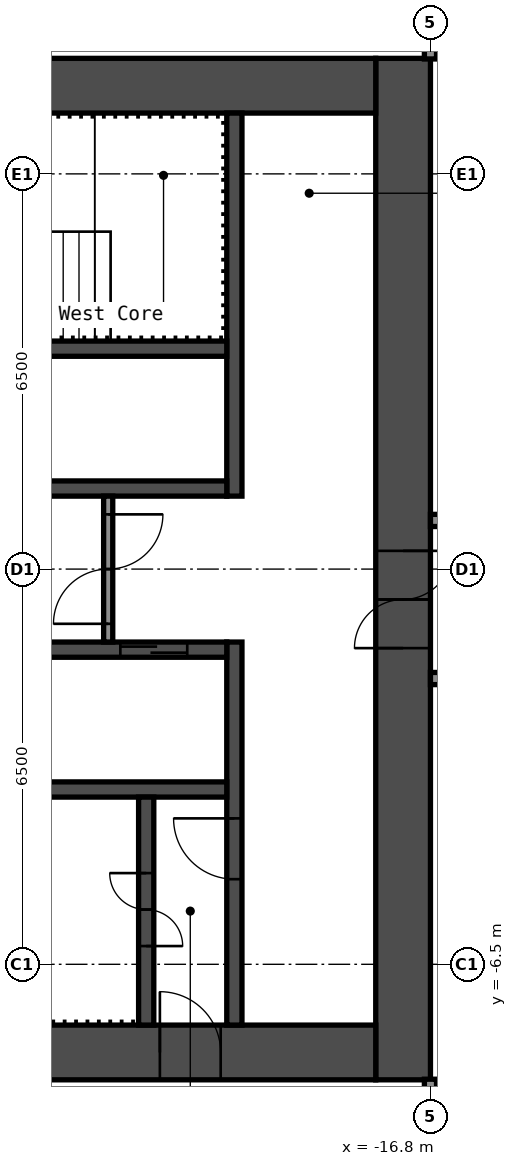
"""IFC4 building model, lengths in metres.
Left out: names, types, materials, properties, quantities, classifications, styles, units other than length and angle.
Written with IfcOpenShell. Run it as: python <this file> out.ifc"""

import sys

from ifc_helpers import new_model, si_unit, direction, frame, frame_2d, origin, place, context, subcontext, project, spatial, rectangle, extrude, element, fill, save


model = new_model("IFC4")
c1 = context("Model", 3, precision=1e-05, world=origin(), true_north=direction((0.0, 1.0)))
c2 = subcontext(c1, "Body", "Model", "MODEL_VIEW")
j1 = project(units=[si_unit("LENGTHUNIT", "METRE"), si_unit("PLANEANGLEUNIT", "RADIAN")], contexts=[c1])
p1 = place(None, origin())
s1 = spatial("IfcSite", under=j1, at=p1, CompositionType="ELEMENT")
p2 = place(p1, origin())
s2 = spatial("IfcBuilding", under=s1, at=p2, CompositionType="ELEMENT")
p3 = place(p2, frame((0.0, 0.0, 137.4)))
s3 = spatial("IfcBuildingStorey", under=s2, at=p3, CompositionType="ELEMENT", Elevation=137.4)
p4 = place(p3, frame((-17.25, -8.4, 0.0), z_axis=(0.0, 0.0, 1.0), x_axis=(0.0, 1.0, 0.0)))
e1 = element("IfcWall", 1, at=p4, inside=s3, PredefinedType="SHEAR", context=c2, shape_type="SweptSolid", body=[
    extrude(rectangle(XDim=16.8, YDim=0.9, at=frame_2d((8.4, 0.0))), origin(), (0.0, 0.0, 1.0), 2.75),
])
p5 = place(p4, frame((7.1, 0.0, 0.0)))
e2 = element("IfcOpeningElement", 2, at=p5, cuts=e1, PredefinedType="OPENING", context=c2, shape_type="SweptSolid", body=[
    extrude(rectangle(XDim=1.6, YDim=2.1, at=frame_2d((0.8, 1.05))), frame((0.0, 0.46, 0.0), z_axis=(0.0, -1.0, 0.0), x_axis=(1.0, 0.0, 0.0)), (0.0, 0.0, 1.0), 0.92),
])
p6 = place(p3, frame((-32.7, 7.95, 0.0), z_axis=(0.0, 0.0, 1.0), x_axis=(1.0, 0.0, 0.0)))
e3 = element("IfcWall", 3, at=p6, inside=s3, PredefinedType="SHEAR", context=c2, shape_type="SweptSolid", body=[
    extrude(rectangle(XDim=15.0, YDim=0.9, at=frame_2d((7.5, 0.0))), origin(), (0.0, 0.0, 1.0), 2.75),
])
p7 = place(p6, frame((3.4, 0.0, 0.0)))
e4 = element("IfcOpeningElement", 4, at=p7, cuts=e3, PredefinedType="OPENING", context=c2, shape_type="SweptSolid", body=[
    extrude(rectangle(XDim=1.2, YDim=2.1, at=frame_2d((0.6, 1.05))), frame((0.0, 0.46, 0.0), z_axis=(0.0, -1.0, 0.0), x_axis=(1.0, 0.0, 0.0)), (0.0, 0.0, 1.0), 0.92),
])
p8 = place(p6, frame((0.75, 0.0, 0.0)))
e5 = element("IfcOpeningElement", 5, at=p8, cuts=e3, PredefinedType="OPENING", context=c2, shape_type="SweptSolid", body=[
    extrude(rectangle(XDim=0.9, YDim=2.1, at=frame_2d((0.45, 1.05))), frame((0.0, 0.46, 0.0), z_axis=(0.0, -1.0, 0.0), x_axis=(1.0, 0.0, 0.0)), (0.0, 0.0, 1.0), 0.92),
])
p9 = place(p3, frame((-32.7, -7.95, 0.0), z_axis=(0.0, 0.0, 1.0), x_axis=(1.0, 0.0, 0.0)))
e6 = element("IfcWall", 6, at=p9, inside=s3, PredefinedType="SHEAR", context=c2, shape_type="SweptSolid", body=[
    extrude(rectangle(XDim=15.0, YDim=0.9, at=frame_2d((7.5, 0.0))), origin(), (0.0, 0.0, 1.0), 2.75),
])
p10 = place(p9, frame((11.45, 0.0, 0.0)))
e7 = element("IfcOpeningElement", 7, at=p10, cuts=e6, PredefinedType="OPENING", context=c2, shape_type="SweptSolid", body=[
    extrude(rectangle(XDim=1.0, YDim=2.1, at=frame_2d((0.5, 1.05))), frame((0.0, 0.46, 0.0), z_axis=(0.0, -1.0, 0.0), x_axis=(1.0, 0.0, 0.0)), (0.0, 0.0, 1.0), 0.92),
])
p11 = place(p3, frame((-20.025, 1.2, 0.0), z_axis=(0.0, 0.0, 1.0), x_axis=(0.0, 1.0, 0.0)))
e8 = element("IfcWall", 8, at=p11, inside=s3, PredefinedType="SHEAR", context=c2, shape_type="SweptSolid", body=[
    extrude(rectangle(XDim=6.3, YDim=0.25, at=frame_2d((3.15, 0.0))), origin(), (0.0, 0.0, 1.0), 2.75),
])
p12 = place(p3, frame((-20.025, -7.5, 0.0), z_axis=(0.0, 0.0, 1.0), x_axis=(0.0, 1.0, 0.0)))
e9 = element("IfcWall", 9, at=p12, inside=s3, PredefinedType="SHEAR", context=c2, shape_type="SweptSolid", body=[
    extrude(rectangle(XDim=6.3, YDim=0.25, at=frame_2d((3.15, 0.0))), origin(), (0.0, 0.0, 1.0), 2.75),
])
p13 = place(p12, frame((2.4, 0.0, 0.0)))
e10 = element("IfcOpeningElement", 10, at=p13, cuts=e9, PredefinedType="OPENING", context=c2, shape_type="SweptSolid", body=[
    extrude(rectangle(XDim=1.0, YDim=2.1, at=frame_2d((0.5, 1.05))), frame((0.0, 0.135, 0.0), z_axis=(0.0, -1.0, 0.0), x_axis=(1.0, 0.0, 0.0)), (0.0, 0.0, 1.0), 0.27),
])
p14 = place(p3, frame((-27.65, 1.325, 0.0), z_axis=(0.0, 0.0, 1.0), x_axis=(1.0, 0.0, 0.0)))
e11 = element("IfcWall", 11, at=p14, inside=s3, PredefinedType="SHEAR", context=c2, shape_type="SweptSolid", body=[
    extrude(rectangle(XDim=7.5, YDim=0.25, at=frame_2d((3.75, 0.0))), origin(), (0.0, 0.0, 1.0), 2.75),
])
p15 = place(p14, frame((3.425, 0.0, 0.0)))
e12 = element("IfcOpeningElement", 12, at=p15, cuts=e11, PredefinedType="OPENING", context=c2, shape_type="SweptSolid", body=[
    extrude(rectangle(XDim=0.9, YDim=2.1, at=frame_2d((0.45, 1.05))), frame((0.0, 0.135, 0.0), z_axis=(0.0, -1.0, 0.0), x_axis=(1.0, 0.0, 0.0)), (0.0, 0.0, 1.0), 0.27),
])
p16 = place(p3, frame((-27.65, 3.625, 0.0), z_axis=(0.0, 0.0, 1.0), x_axis=(1.0, 0.0, 0.0)))
e13 = element("IfcWall", 13, at=p16, inside=s3, PredefinedType="SHEAR", context=c2, shape_type="SweptSolid", body=[
    extrude(rectangle(XDim=7.5, YDim=0.25, at=frame_2d((3.75, 0.0))), origin(), (0.0, 0.0, 1.0), 2.75),
])
p17 = place(p3, frame((-27.65, -1.325, 0.0), z_axis=(0.0, 0.0, 1.0), x_axis=(1.0, 0.0, 0.0)))
e14 = element("IfcWall", 14, at=p17, inside=s3, PredefinedType="SHEAR", context=c2, shape_type="SweptSolid", body=[
    extrude(rectangle(XDim=7.5, YDim=0.25, at=frame_2d((3.75, 0.0))), origin(), (0.0, 0.0, 1.0), 2.75),
])
p18 = place(p17, frame((5.75, 0.0, 0.0)))
e15 = element("IfcOpeningElement", 15, at=p18, cuts=e14, PredefinedType="OPENING", context=c2, shape_type="SweptSolid", body=[
    extrude(rectangle(XDim=1.1, YDim=2.1, at=frame_2d((0.55, 1.05))), frame((0.0, 0.135, 0.0), z_axis=(0.0, -1.0, 0.0), x_axis=(1.0, 0.0, 0.0)), (0.0, 0.0, 1.0), 0.27),
])
p19 = place(p17, frame((3.35, 0.0, 0.0)))
e16 = element("IfcOpeningElement", 16, at=p19, cuts=e14, PredefinedType="OPENING", context=c2, shape_type="SweptSolid", body=[
    extrude(rectangle(XDim=1.1, YDim=2.1, at=frame_2d((0.55, 1.05))), frame((0.0, 0.135, 0.0), z_axis=(0.0, -1.0, 0.0), x_axis=(1.0, 0.0, 0.0)), (0.0, 0.0, 1.0), 0.27),
])
p20 = place(p17, frame((0.95, 0.0, 0.0)))
e17 = element("IfcOpeningElement", 17, at=p20, cuts=e14, PredefinedType="OPENING", context=c2, shape_type="SweptSolid", body=[
    extrude(rectangle(XDim=1.1, YDim=2.1, at=frame_2d((0.55, 1.05))), frame((0.0, 0.135, 0.0), z_axis=(0.0, -1.0, 0.0), x_axis=(1.0, 0.0, 0.0)), (0.0, 0.0, 1.0), 0.27),
])
p21 = place(p3, frame((-27.65, -3.625, 0.0), z_axis=(0.0, 0.0, 1.0), x_axis=(1.0, 0.0, 0.0)))
e18 = element("IfcWall", 18, at=p21, inside=s3, PredefinedType="SHEAR", context=c2, shape_type="SweptSolid", body=[
    extrude(rectangle(XDim=7.5, YDim=0.25, at=frame_2d((3.75, 0.0))), origin(), (0.0, 0.0, 1.0), 2.75),
])
p22 = place(p3, frame((-21.475, -7.5, 0.0), z_axis=(0.0, 0.0, 1.0), x_axis=(0.0, 1.0, 0.0)))
e19 = element("IfcWall", 19, at=p22, inside=s3, PredefinedType="SHEAR", context=c2, shape_type="SweptSolid", body=[
    extrude(rectangle(XDim=3.75, YDim=0.25, at=frame_2d((1.875, 0.0))), origin(), (0.0, 0.0, 1.0), 2.75),
])
p23 = place(p22, frame((1.3, 0.0, 0.0)))
e20 = element("IfcOpeningElement", 20, at=p23, cuts=e19, PredefinedType="OPENING", context=c2, shape_type="SweptSolid", body=[
    extrude(rectangle(XDim=1.2, YDim=2.1, at=frame_2d((0.6, 1.05))), frame((0.0, 0.135, 0.0), z_axis=(0.0, -1.0, 0.0), x_axis=(1.0, 0.0, 0.0)), (0.0, 0.0, 1.0), 0.27),
])
p24 = place(p3, frame((-22.1, -1.2, 0.0), z_axis=(0.0, 0.0, 1.0), x_axis=(0.0, 1.0, 0.0)))
e21 = element("IfcWall", 21, at=p24, inside=s3, PredefinedType="PARTITIONING", context=c2, shape_type="SweptSolid", body=[
    extrude(rectangle(XDim=2.4, YDim=0.15, at=frame_2d((1.2, 0.0))), origin(), (0.0, 0.0, 1.0), 2.75),
])
p25 = place(p24, frame((0.3, 0.0, 0.0)))
e22 = element("IfcOpeningElement", 22, at=p25, cuts=e21, PredefinedType="OPENING", context=c2, shape_type="SweptSolid", body=[
    extrude(rectangle(XDim=1.8, YDim=2.1, at=frame_2d((0.9, 1.05))), frame((0.0, 0.085, 0.0), z_axis=(0.0, -1.0, 0.0), x_axis=(1.0, 0.0, 0.0)), (0.0, 0.0, 1.0), 0.17),
])
p26 = place(p3, frame((-16.8, -1.8, 0.0), z_axis=(0.0, 0.0, 1.0), x_axis=(1.0, 0.0, 0.0)))
e23 = element("IfcWall", 23, at=p26, inside=s3, PredefinedType="PARTITIONING", context=c2, shape_type="SweptSolid", body=[
    extrude(rectangle(XDim=33.6, YDim=0.2, at=frame_2d((16.8, 0.0))), origin(), (0.0, 0.0, 1.0), 2.75),
])
p27 = place(p26, frame((2.0, 0.0, 0.0)))
e24 = element("IfcOpeningElement", 24, at=p27, cuts=e23, PredefinedType="OPENING", context=c2, shape_type="SweptSolid", body=[
    extrude(rectangle(XDim=1.0, YDim=2.1, at=frame_2d((0.5, 1.05))), frame((0.0, 0.11, 0.0), z_axis=(0.0, -1.0, 0.0), x_axis=(1.0, 0.0, 0.0)), (0.0, 0.0, 1.0), 0.22),
])
p28 = place(p26, frame((11.25, 0.0, 0.0)))
e25 = element("IfcOpeningElement", 25, at=p28, cuts=e23, PredefinedType="OPENING", context=c2, shape_type="SweptSolid", body=[
    extrude(rectangle(XDim=1.0, YDim=2.1, at=frame_2d((0.5, 1.05))), frame((0.0, 0.11, 0.0), z_axis=(0.0, -1.0, 0.0), x_axis=(1.0, 0.0, 0.0)), (0.0, 0.0, 1.0), 0.22),
])
p29 = place(p26, frame((12.95, 0.0, 0.0)))
e26 = element("IfcOpeningElement", 26, at=p29, cuts=e23, PredefinedType="OPENING", context=c2, shape_type="SweptSolid", body=[
    extrude(rectangle(XDim=1.0, YDim=2.1, at=frame_2d((0.5, 1.05))), frame((0.0, 0.11, 0.0), z_axis=(0.0, -1.0, 0.0), x_axis=(1.0, 0.0, 0.0)), (0.0, 0.0, 1.0), 0.22),
])
p30 = place(p26, frame((17.86, 0.0, 0.0)))
e27 = element("IfcOpeningElement", 27, at=p30, cuts=e23, PredefinedType="OPENING", context=c2, shape_type="SweptSolid", body=[
    extrude(rectangle(XDim=0.9, YDim=2.1, at=frame_2d((0.45, 1.05))), frame((0.0, 0.11, 0.0), z_axis=(0.0, -1.0, 0.0), x_axis=(1.0, 0.0, 0.0)), (0.0, 0.0, 1.0), 0.22),
])
p31 = place(p26, frame((22.06, 0.0, 0.0)))
e28 = element("IfcOpeningElement", 28, at=p31, cuts=e23, PredefinedType="OPENING", context=c2, shape_type="SweptSolid", body=[
    extrude(rectangle(XDim=0.9, YDim=2.1, at=frame_2d((0.45, 1.05))), frame((0.0, 0.11, 0.0), z_axis=(0.0, -1.0, 0.0), x_axis=(1.0, 0.0, 0.0)), (0.0, 0.0, 1.0), 0.22),
])
p32 = place(p26, frame((28.05, 0.0, 0.0)))
e29 = element("IfcOpeningElement", 29, at=p32, cuts=e23, PredefinedType="OPENING", context=c2, shape_type="SweptSolid", body=[
    extrude(rectangle(XDim=1.0, YDim=2.1, at=frame_2d((0.5, 1.05))), frame((0.0, 0.11, 0.0), z_axis=(0.0, -1.0, 0.0), x_axis=(1.0, 0.0, 0.0)), (0.0, 0.0, 1.0), 0.22),
])
p33 = place(p26, frame((29.75, 0.0, 0.0)))
e30 = element("IfcOpeningElement", 30, at=p33, cuts=e23, PredefinedType="OPENING", context=c2, shape_type="SweptSolid", body=[
    extrude(rectangle(XDim=1.0, YDim=2.1, at=frame_2d((0.5, 1.05))), frame((0.0, 0.11, 0.0), z_axis=(0.0, -1.0, 0.0), x_axis=(1.0, 0.0, 0.0)), (0.0, 0.0, 1.0), 0.22),
])
p34 = place(p3, frame((-16.8, 0.8, 0.0), z_axis=(0.0, 0.0, 1.0), x_axis=(1.0, 0.0, 0.0)))
e31 = element("IfcWall", 31, at=p34, inside=s3, PredefinedType="PARTITIONING", context=c2, shape_type="SweptSolid", body=[
    extrude(rectangle(XDim=33.6, YDim=0.2, at=frame_2d((16.8, 0.0))), origin(), (0.0, 0.0, 1.0), 2.75),
])
p35 = place(p34, frame((2.0, 0.0, 0.0)))
e32 = element("IfcOpeningElement", 32, at=p35, cuts=e31, PredefinedType="OPENING", context=c2, shape_type="SweptSolid", body=[
    extrude(rectangle(XDim=1.0, YDim=2.1, at=frame_2d((0.5, 1.05))), frame((0.0, 0.11, 0.0), z_axis=(0.0, -1.0, 0.0), x_axis=(1.0, 0.0, 0.0)), (0.0, 0.0, 1.0), 0.22),
])
p36 = place(p34, frame((11.25, 0.0, 0.0)))
e33 = element("IfcOpeningElement", 33, at=p36, cuts=e31, PredefinedType="OPENING", context=c2, shape_type="SweptSolid", body=[
    extrude(rectangle(XDim=1.0, YDim=2.1, at=frame_2d((0.5, 1.05))), frame((0.0, 0.11, 0.0), z_axis=(0.0, -1.0, 0.0), x_axis=(1.0, 0.0, 0.0)), (0.0, 0.0, 1.0), 0.22),
])
p37 = place(p34, frame((12.95, 0.0, 0.0)))
e34 = element("IfcOpeningElement", 34, at=p37, cuts=e31, PredefinedType="OPENING", context=c2, shape_type="SweptSolid", body=[
    extrude(rectangle(XDim=1.0, YDim=2.1, at=frame_2d((0.5, 1.05))), frame((0.0, 0.11, 0.0), z_axis=(0.0, -1.0, 0.0), x_axis=(1.0, 0.0, 0.0)), (0.0, 0.0, 1.0), 0.22),
])
p38 = place(p34, frame((18.7, 0.0, 0.0)))
e35 = element("IfcOpeningElement", 35, at=p38, cuts=e31, PredefinedType="OPENING", context=c2, shape_type="SweptSolid", body=[
    extrude(rectangle(XDim=0.9, YDim=2.1, at=frame_2d((0.45, 1.05))), frame((0.0, 0.11, 0.0), z_axis=(0.0, -1.0, 0.0), x_axis=(1.0, 0.0, 0.0)), (0.0, 0.0, 1.0), 0.22),
])
p39 = place(p34, frame((22.9, 0.0, 0.0)))
e36 = element("IfcOpeningElement", 36, at=p39, cuts=e31, PredefinedType="OPENING", context=c2, shape_type="SweptSolid", body=[
    extrude(rectangle(XDim=0.9, YDim=2.1, at=frame_2d((0.45, 1.05))), frame((0.0, 0.11, 0.0), z_axis=(0.0, -1.0, 0.0), x_axis=(1.0, 0.0, 0.0)), (0.0, 0.0, 1.0), 0.22),
])
p40 = place(p34, frame((28.05, 0.0, 0.0)))
e37 = element("IfcOpeningElement", 37, at=p40, cuts=e31, PredefinedType="OPENING", context=c2, shape_type="SweptSolid", body=[
    extrude(rectangle(XDim=1.0, YDim=2.1, at=frame_2d((0.5, 1.05))), frame((0.0, 0.11, 0.0), z_axis=(0.0, -1.0, 0.0), x_axis=(1.0, 0.0, 0.0)), (0.0, 0.0, 1.0), 0.22),
])
p41 = place(p34, frame((29.75, 0.0, 0.0)))
e38 = element("IfcOpeningElement", 38, at=p41, cuts=e31, PredefinedType="OPENING", context=c2, shape_type="SweptSolid", body=[
    extrude(rectangle(XDim=1.0, YDim=2.1, at=frame_2d((0.5, 1.05))), frame((0.0, 0.11, 0.0), z_axis=(0.0, -1.0, 0.0), x_axis=(1.0, 0.0, 0.0)), (0.0, 0.0, 1.0), 0.22),
])
p42 = place(p3, frame((-16.8, -19.3, 0.0), z_axis=(0.0, 0.0, 1.0), x_axis=(0.0, 1.0, 0.0)))
e39 = element("IfcWall", 39, at=p42, inside=s3, PredefinedType="PARTITIONING", context=c2, shape_type="SweptSolid", body=[
    extrude(rectangle(XDim=10.91, YDim=0.2, at=frame_2d((5.455, 0.0))), origin(), (0.0, 0.0, 1.0), 2.75),
])
p43 = place(p3, frame((-16.8, 8.39, 0.0), z_axis=(0.0, 0.0, 1.0), x_axis=(0.0, 1.0, 0.0)))
e40 = element("IfcWall", 40, at=p43, inside=s3, PredefinedType="PARTITIONING", context=c2, shape_type="SweptSolid", body=[
    extrude(rectangle(XDim=9.91, YDim=0.2, at=frame_2d((4.955, 0.0))), origin(), (0.0, 0.0, 1.0), 2.75),
])
p44 = place(p5, origin())
e41 = element("IfcDoor", 41, at=p44, inside=s3, OperationType="DOUBLE_DOOR_SINGLE_SWING", PredefinedType="DOOR", context=c2, shape_type="SweptSolid", body=[
    extrude(rectangle(XDim=1.6, YDim=2.1, at=frame_2d((0.8, 1.05))), frame((0.0, 0.025, 0.0), z_axis=(0.0, -1.0, 0.0), x_axis=(1.0, 0.0, 0.0)), (0.0, 0.0, 1.0), 0.05),
])
fill(e2, e41)
p45 = place(p10, origin())
e42 = element("IfcDoor", 42, at=p45, inside=s3, OperationType="SINGLE_SWING_RIGHT", PredefinedType="DOOR", context=c2, shape_type="SweptSolid", body=[
    extrude(rectangle(XDim=1.0, YDim=2.1, at=frame_2d((0.5, 1.05))), frame((0.0, 0.025, 0.0), z_axis=(0.0, -1.0, 0.0), x_axis=(1.0, 0.0, 0.0)), (0.0, 0.0, 1.0), 0.05),
])
fill(e7, e42)
p46 = place(p23, origin())
e43 = element("IfcDoor", 43, at=p46, inside=s3, OperationType="DOUBLE_DOOR_SINGLE_SWING", PredefinedType="DOOR", context=c2, shape_type="SweptSolid", body=[
    extrude(rectangle(XDim=1.2, YDim=2.1, at=frame_2d((0.6, 1.05))), frame((0.0, 0.025, 0.0), z_axis=(0.0, -1.0, 0.0), x_axis=(1.0, 0.0, 0.0)), (0.0, 0.0, 1.0), 0.05),
])
fill(e20, e43)
p47 = place(p13, origin())
e44 = element("IfcDoor", 44, at=p47, inside=s3, OperationType="SINGLE_SWING_LEFT", PredefinedType="DOOR", context=c2, shape_type="SweptSolid", body=[
    extrude(rectangle(XDim=1.0, YDim=2.1, at=frame_2d((0.5, 1.05))), frame((0.0, 0.025, 0.0), z_axis=(0.0, -1.0, 0.0), x_axis=(1.0, 0.0, 0.0)), (0.0, 0.0, 1.0), 0.05),
])
fill(e10, e44)
p48 = place(p25, origin())
e45 = element("IfcDoor", 45, at=p48, inside=s3, OperationType="DOUBLE_DOOR_SINGLE_SWING", PredefinedType="DOOR", context=c2, shape_type="SweptSolid", body=[
    extrude(rectangle(XDim=1.8, YDim=2.1, at=frame_2d((0.9, 1.05))), frame((0.0, 0.025, 0.0), z_axis=(0.0, -1.0, 0.0), x_axis=(1.0, 0.0, 0.0)), (0.0, 0.0, 1.0), 0.05),
])
fill(e22, e45)
p49 = place(p18, origin())
e46 = element("IfcDoor", 46, at=p49, inside=s3, OperationType="DOUBLE_DOOR_SLIDING", PredefinedType="DOOR", context=c2, shape_type="SweptSolid", body=[
    extrude(rectangle(XDim=1.1, YDim=2.1, at=frame_2d((0.55, 1.05))), frame((0.0, 0.025, 0.0), z_axis=(0.0, -1.0, 0.0), x_axis=(1.0, 0.0, 0.0)), (0.0, 0.0, 1.0), 0.05),
])
fill(e15, e46)
save(model, sys.argv[1])
